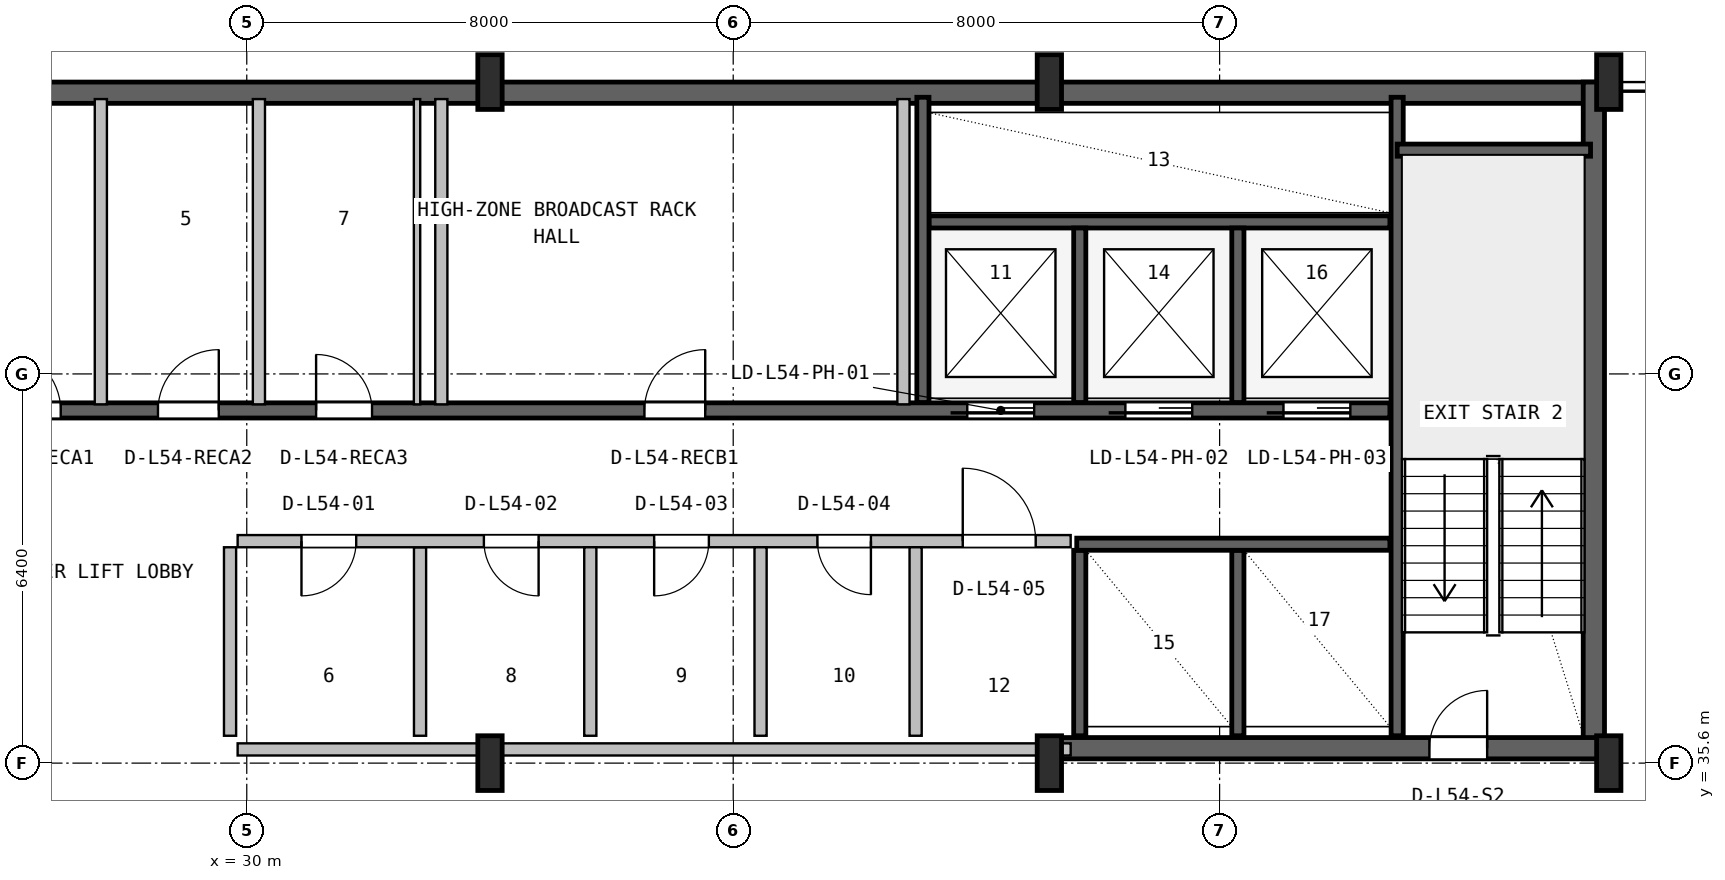
"""IFC4 building model, lengths in metres.
Left out: names, types, materials, properties, quantities, classifications, styles, units other than length and angle.
Written with IfcOpenShell. Run it as: python <this file> out.ifc"""

import sys

from ifc_helpers import new_model, si_unit, direction, frame, frame_2d, origin, origin_2d, place, context, subcontext, project, spatial, rectangle, i_section, extrude, source, transform, mapped, element, fill, save


model = new_model("IFC4")
c1 = context("Model", 3, precision=1e-05, world=origin(), true_north=direction((0.0, 1.0)))
c2 = subcontext(c1, "Body", "Model", "MODEL_VIEW")
j1 = project(units=[si_unit("LENGTHUNIT", "METRE"), si_unit("PLANEANGLEUNIT", "RADIAN")], contexts=[c1])
p1 = place(None, origin())
s1 = spatial("IfcSite", under=j1, at=p1, CompositionType="ELEMENT")
p2 = place(p1, origin())
s2 = spatial("IfcBuilding", under=s1, at=p2, CompositionType="ELEMENT")
p3 = place(p2, frame((0.0, 0.0, 218.8)))
s3 = spatial("IfcBuildingStorey", under=s2, at=p3, CompositionType="ELEMENT", Elevation=218.8)
p4 = place(p3, frame((15.6, 46.625, 0.0), z_axis=(0.0, 0.0, 1.0), x_axis=(1.0, 0.0, 0.0)))
e1 = element("IfcWall", 1, at=p4, inside=s3, PredefinedType="SHEAR", context=c2, shape_type="SweptSolid", body=[
    extrude(rectangle(XDim=36.8, YDim=0.35, at=frame_2d((18.4, 0.0))), origin(), (0.0, 0.0, 1.0), 3.55),
])
p5 = place(p3, frame((52.155, 35.67, 0.0), z_axis=(0.0, 0.0, 1.0), x_axis=(0.0, 1.0, 0.0)))
e2 = element("IfcWall", 2, at=p5, inside=s3, PredefinedType="SHEAR", context=c2, shape_type="SweptSolid", body=[
    extrude(rectangle(XDim=11.13, YDim=0.35, at=frame_2d((5.565, 0.0))), origin(), (0.0, 0.0, 1.0), 3.55),
])
p6 = place(p3, frame((43.2, 35.845, 0.0), z_axis=(0.0, 0.0, 1.0), x_axis=(1.0, 0.0, 0.0)))
e3 = element("IfcWall", 3, at=p6, inside=s3, PredefinedType="SHEAR", context=c2, shape_type="SweptSolid", body=[
    extrude(rectangle(XDim=9.13, YDim=0.35, at=frame_2d((4.565, 0.0))), origin(), (0.0, 0.0, 1.0), 3.55),
])
p7 = place(p6, frame((6.25, 0.0, 0.0)))
e4 = element("IfcOpeningElement", 4, at=p7, cuts=e3, PredefinedType="OPENING", context=c2, shape_type="SweptSolid", body=[
    extrude(rectangle(XDim=0.95, YDim=2.1, at=frame_2d((0.475, 1.05))), frame((0.0, 0.185, 0.0), z_axis=(0.0, -1.0, 0.0), x_axis=(1.0, 0.0, 0.0)), (0.0, 0.0, 1.0), 0.37),
])
m1 = source(origin(), c2, "Body", "SweptSolid", [
    extrude(i_section(OverallWidth=0.4, OverallDepth=0.9, WebThickness=0.016, FlangeThickness=0.028, FilletRadius=0.016, at=origin_2d()), origin(), (0.0, 0.0, 1.0), 3.8),
])
for number, where, z_axis, x_axis in (
    (5, (34.0, 35.6, 0.0), (0.0, 0.0, 1.0), (1.0, 0.0, 0.0)),
    (6, (34.0, 46.8, 0.0), (0.0, 0.0, 1.0), (1.0, 0.0, 0.0)),
    (7, (43.2, 35.6, 0.0), (0.0, 0.0, 1.0), (1.0, 0.0, 0.0)),
    (8, (43.2, 46.8, 0.0), (0.0, 0.0, 1.0), (1.0, 0.0, 0.0)),
    (9, (52.4, 35.6, 0.0), (0.0, 0.0, 1.0), (1.0, 0.0, 0.0)),
    (10, (52.4, 46.8, 0.0), (0.0, 0.0, 1.0), (1.0, 0.0, 0.0)),
):
    element("IfcColumn", number, at=place(p3, frame(where, z_axis=z_axis, x_axis=x_axis)), inside=s3, PredefinedType="COLUMN", context=c2, shape_type="MappedRepresentation", body=[
        mapped(m1, transform((0.0, 0.0, 0.0), x_axis=(1.0, 0.0, 0.0), y_axis=(0.0, 1.0, 0.0), z_axis=(0.0, 0.0, 1.0), scale=1.0)),
    ])
p8 = place(p3, frame((48.92, 36.05, 0.0), z_axis=(0.0, 0.0, 1.0), x_axis=(0.0, 1.0, 0.0)))
e11 = element("IfcWall", 11, at=p8, inside=s3, PredefinedType="SHEAR", context=c2, shape_type="SweptSolid", body=[
    extrude(rectangle(XDim=10.5, YDim=0.2, at=frame_2d((5.25, 0.0))), origin(), (0.0, 0.0, 1.0), 3.55),
])
p9 = place(p3, frame((48.92, 45.68, 0.0), z_axis=(0.0, 0.0, 1.0), x_axis=(1.0, 0.0, 0.0)))
e12 = element("IfcWall", 12, at=p9, inside=s3, PredefinedType="SHEAR", context=c2, shape_type="SweptSolid", body=[
    extrude(rectangle(XDim=3.18, YDim=0.2, at=frame_2d((1.59, 0.0))), origin(), (0.0, 0.0, 1.0), 3.55),
])
p10 = place(p3, frame((24.98, 41.4, 0.0), z_axis=(0.0, 0.0, 1.0), x_axis=(1.0, 0.0, 0.0)))
e13 = element("IfcWall", 13, at=p10, inside=s3, PredefinedType="SHEAR", context=c2, shape_type="SweptSolid", body=[
    extrude(rectangle(XDim=23.82, YDim=0.25, at=frame_2d((11.91, 0.0))), origin(), (0.0, 0.0, 1.0), 3.55),
])
p11 = place(p10, frame((16.87, 0.0, 0.0)))
e14 = element("IfcOpeningElement", 14, at=p11, cuts=e13, PredefinedType="OPENING", context=c2, shape_type="SweptSolid", body=[
    extrude(rectangle(XDim=1.1, YDim=2.18, at=frame_2d((0.55, 1.09))), frame((0.0, 0.135, 0.0), z_axis=(0.0, -1.0, 0.0), x_axis=(1.0, 0.0, 0.0)), (0.0, 0.0, 1.0), 0.27),
])
p12 = place(p10, frame((19.47, 0.0, 0.0)))
e15 = element("IfcOpeningElement", 15, at=p12, cuts=e13, PredefinedType="OPENING", context=c2, shape_type="SweptSolid", body=[
    extrude(rectangle(XDim=1.1, YDim=2.18, at=frame_2d((0.55, 1.09))), frame((0.0, 0.135, 0.0), z_axis=(0.0, -1.0, 0.0), x_axis=(1.0, 0.0, 0.0)), (0.0, 0.0, 1.0), 0.27),
])
p13 = place(p10, frame((22.07, 0.0, 0.0)))
e16 = element("IfcOpeningElement", 16, at=p13, cuts=e13, PredefinedType="OPENING", context=c2, shape_type="SweptSolid", body=[
    extrude(rectangle(XDim=1.1, YDim=2.18, at=frame_2d((0.55, 1.09))), frame((0.0, 0.135, 0.0), z_axis=(0.0, -1.0, 0.0), x_axis=(1.0, 0.0, 0.0)), (0.0, 0.0, 1.0), 0.27),
])
p14 = place(p10, frame((0.96, 0.0, 0.0)))
e17 = element("IfcOpeningElement", 17, at=p14, cuts=e13, PredefinedType="OPENING", context=c2, shape_type="SweptSolid", body=[
    extrude(rectangle(XDim=1.0, YDim=2.08, at=frame_2d((0.5, 1.04))), frame((0.0, 0.135, 0.0), z_axis=(0.0, -1.0, 0.0), x_axis=(1.0, 0.0, 0.0)), (0.0, 0.0, 1.0), 0.27),
])
p15 = place(p10, frame((3.56, 0.0, 0.0)))
e18 = element("IfcOpeningElement", 18, at=p15, cuts=e13, PredefinedType="OPENING", context=c2, shape_type="SweptSolid", body=[
    extrude(rectangle(XDim=1.0, YDim=2.08, at=frame_2d((0.5, 1.04))), frame((0.0, 0.135, 0.0), z_axis=(0.0, -1.0, 0.0), x_axis=(1.0, 0.0, 0.0)), (0.0, 0.0, 1.0), 0.27),
])
p16 = place(p10, frame((6.16, 0.0, 0.0)))
e19 = element("IfcOpeningElement", 19, at=p16, cuts=e13, PredefinedType="OPENING", context=c2, shape_type="SweptSolid", body=[
    extrude(rectangle(XDim=0.92, YDim=2.08, at=frame_2d((0.46, 1.04))), frame((0.0, 0.135, 0.0), z_axis=(0.0, -1.0, 0.0), x_axis=(1.0, 0.0, 0.0)), (0.0, 0.0, 1.0), 0.27),
])
p17 = place(p10, frame((11.56, 0.0, 0.0)))
e20 = element("IfcOpeningElement", 20, at=p17, cuts=e13, PredefinedType="OPENING", context=c2, shape_type="SweptSolid", body=[
    extrude(rectangle(XDim=1.0, YDim=2.08, at=frame_2d((0.5, 1.04))), frame((0.0, 0.135, 0.0), z_axis=(0.0, -1.0, 0.0), x_axis=(1.0, 0.0, 0.0)), (0.0, 0.0, 1.0), 0.27),
])
p18 = place(p3, frame((41.22, 44.5, 0.0), z_axis=(0.0, 0.0, 1.0), x_axis=(1.0, 0.0, 0.0)))
e21 = element("IfcWall", 21, at=p18, inside=s3, PredefinedType="SHEAR", context=c2, shape_type="SweptSolid", body=[
    extrude(rectangle(XDim=7.58, YDim=0.2, at=frame_2d((3.79, 0.0))), origin(), (0.0, 0.0, 1.0), 3.55),
])
p19 = place(p3, frame((41.12, 41.53, 0.0), z_axis=(0.0, 0.0, 1.0), x_axis=(0.0, 1.0, 0.0)))
e22 = element("IfcWall", 22, at=p19, inside=s3, PredefinedType="SHEAR", context=c2, shape_type="SweptSolid", body=[
    extrude(rectangle(XDim=5.02, YDim=0.2, at=frame_2d((2.51, 0.0))), origin(), (0.0, 0.0, 1.0), 3.55),
])
for number, where, z_axis, x_axis in (
    (23, (43.7, 41.53, 0.0), (0.0, 0.0, 1.0), (0.0, 1.0, 0.0)),
    (24, (46.3, 41.53, 0.0), (0.0, 0.0, 1.0), (0.0, 1.0, 0.0)),
):
    element("IfcWall", number, at=place(p3, frame(where, z_axis=z_axis, x_axis=x_axis)), inside=s3, PredefinedType="SHEAR", context=c2, shape_type="SweptSolid", body=[
        extrude(rectangle(XDim=2.87, YDim=0.2, at=frame_2d((1.435, 0.0))), origin(), (0.0, 0.0, 1.0), 3.55),
    ])
for number, where, z_axis, x_axis in (
    (25, (43.7, 36.05, 0.0), (0.0, 0.0, 1.0), (0.0, 1.0, 0.0)),
    (26, (46.3, 36.05, 0.0), (0.0, 0.0, 1.0), (0.0, 1.0, 0.0)),
):
    element("IfcWall", number, at=place(p3, frame(where, z_axis=z_axis, x_axis=x_axis)), inside=s3, PredefinedType="SHEAR", context=c2, shape_type="SweptSolid", body=[
        extrude(rectangle(XDim=3.05, YDim=0.2, at=frame_2d((1.525, 0.0))), origin(), (0.0, 0.0, 1.0), 3.55),
    ])
p20 = place(p3, frame((43.65, 39.2, 0.0), z_axis=(0.0, 0.0, 1.0), x_axis=(1.0, 0.0, 0.0)))
e27 = element("IfcWall", 27, at=p20, inside=s3, PredefinedType="SHEAR", context=c2, shape_type="SweptSolid", body=[
    extrude(rectangle(XDim=5.15, YDim=0.2, at=frame_2d((2.575, 0.0))), origin(), (0.0, 0.0, 1.0), 3.55),
])
p21 = place(p3, frame((29.85, 35.825, 0.0), z_axis=(0.0, 0.0, 1.0), x_axis=(1.0, 0.0, 0.0)))
e28 = element("IfcWall", 28, at=p21, inside=s3, PredefinedType="SOLIDWALL", context=c2, shape_type="SweptSolid", body=[
    extrude(rectangle(XDim=13.7, YDim=0.2, at=frame_2d((6.85, 0.0))), origin(), (0.0, 0.0, 1.0), 2.575),
])
p22 = place(p3, frame((32.85, 36.05, 0.0), z_axis=(0.0, 0.0, 1.0), x_axis=(0.0, 1.0, 0.0)))
e29 = element("IfcWall", 29, at=p22, inside=s3, PredefinedType="PLUMBINGWALL", context=c2, shape_type="SweptSolid", body=[
    extrude(rectangle(XDim=3.1, YDim=0.2, at=frame_2d((1.55, 0.0))), origin(), (0.0, 0.0, 1.0), 3.53),
])
p23 = place(p3, frame((29.85, 39.25, 0.0), z_axis=(0.0, 0.0, 1.0), x_axis=(1.0, 0.0, 0.0)))
e30 = element("IfcWall", 30, at=p23, inside=s3, PredefinedType="SOLIDWALL", context=c2, shape_type="SweptSolid", body=[
    extrude(rectangle(XDim=13.7, YDim=0.2, at=frame_2d((6.85, 0.0))), origin(), (0.0, 0.0, 1.0), 3.53),
])
p24 = place(p23, frame((1.05, 0.0, 0.0)))
e31 = element("IfcOpeningElement", 31, at=p24, cuts=e30, PredefinedType="OPENING", context=c2, shape_type="SweptSolid", body=[
    extrude(rectangle(XDim=0.9, YDim=2.06, at=frame_2d((0.45, 1.03))), frame((0.0, 0.11, 0.0), z_axis=(0.0, -1.0, 0.0), x_axis=(1.0, 0.0, 0.0)), (0.0, 0.0, 1.0), 0.22),
])
p25 = place(p23, frame((4.05, 0.0, 0.0)))
e32 = element("IfcOpeningElement", 32, at=p25, cuts=e30, PredefinedType="OPENING", context=c2, shape_type="SweptSolid", body=[
    extrude(rectangle(XDim=0.9, YDim=2.06, at=frame_2d((0.45, 1.03))), frame((0.0, 0.11, 0.0), z_axis=(0.0, -1.0, 0.0), x_axis=(1.0, 0.0, 0.0)), (0.0, 0.0, 1.0), 0.22),
])
p26 = place(p23, frame((6.85, 0.0, 0.0)))
e33 = element("IfcOpeningElement", 33, at=p26, cuts=e30, PredefinedType="OPENING", context=c2, shape_type="SweptSolid", body=[
    extrude(rectangle(XDim=0.9, YDim=2.06, at=frame_2d((0.45, 1.03))), frame((0.0, 0.11, 0.0), z_axis=(0.0, -1.0, 0.0), x_axis=(1.0, 0.0, 0.0)), (0.0, 0.0, 1.0), 0.22),
])
p27 = place(p23, frame((9.535, 0.0, 0.0)))
e34 = element("IfcOpeningElement", 34, at=p27, cuts=e30, PredefinedType="OPENING", context=c2, shape_type="SweptSolid", body=[
    extrude(rectangle(XDim=0.88, YDim=2.06, at=frame_2d((0.44, 1.03))), frame((0.0, 0.11, 0.0), z_axis=(0.0, -1.0, 0.0), x_axis=(1.0, 0.0, 0.0)), (0.0, 0.0, 1.0), 0.22),
])
p28 = place(p23, frame((11.925, 0.0, 0.0)))
e35 = element("IfcOpeningElement", 35, at=p28, cuts=e30, PredefinedType="OPENING", context=c2, shape_type="SweptSolid", body=[
    extrude(rectangle(XDim=1.2, YDim=2.1, at=frame_2d((0.6, 1.05))), frame((0.0, 0.11, 0.0), z_axis=(0.0, -1.0, 0.0), x_axis=(1.0, 0.0, 0.0)), (0.0, 0.0, 1.0), 0.22),
])
for number, where, z_axis, x_axis in (
    (36, (29.725, 36.05, 0.0), (0.0, 0.0, 1.0), (0.0, 1.0, 0.0)),
    (37, (35.65, 36.05, 0.0), (0.0, 0.0, 1.0), (0.0, 1.0, 0.0)),
    (38, (38.45, 36.05, 0.0), (0.0, 0.0, 1.0), (0.0, 1.0, 0.0)),
):
    element("IfcWall", number, at=place(p3, frame(where, z_axis=z_axis, x_axis=x_axis)), inside=s3, PredefinedType="PLUMBINGWALL", context=c2, shape_type="SweptSolid", body=[
        extrude(rectangle(XDim=3.1, YDim=0.2, at=frame_2d((1.55, 0.0))), origin(), (0.0, 0.0, 1.0), 3.53),
    ])
p29 = place(p3, frame((41.0, 36.05, 0.0), z_axis=(0.0, 0.0, 1.0), x_axis=(0.0, 1.0, 0.0)))
e39 = element("IfcWall", 39, at=p29, inside=s3, PredefinedType="SOLIDWALL", context=c2, shape_type="SweptSolid", body=[
    extrude(rectangle(XDim=3.1, YDim=0.2, at=frame_2d((1.55, 0.0))), origin(), (0.0, 0.0, 1.0), 3.53),
])
for number, where, z_axis, x_axis in (
    (40, (27.6, 41.5, 0.0), (0.0, 0.0, 1.0), (0.0, 1.0, 0.0)),
    (41, (30.2, 41.5, 0.0), (0.0, 0.0, 1.0), (0.0, 1.0, 0.0)),
):
    element("IfcWall", number, at=place(p3, frame(where, z_axis=z_axis, x_axis=x_axis)), inside=s3, PredefinedType="SOLIDWALL", context=c2, shape_type="SweptSolid", body=[
        extrude(rectangle(XDim=5.02, YDim=0.2, at=frame_2d((2.51, 0.0))), origin(), (0.0, 0.0, 1.0), 3.53),
    ])
p30 = place(p3, frame((32.8, 41.5, 0.0), z_axis=(0.0, 0.0, 1.0), x_axis=(0.0, 1.0, 0.0)))
e42 = element("IfcWall", 42, at=p30, inside=s3, PredefinedType="PARTITIONING", context=c2, shape_type="SweptSolid", body=[
    extrude(rectangle(XDim=5.02, YDim=0.105, at=frame_2d((2.51, 0.0))), origin(), (0.0, 0.0, 1.0), 3.53),
])
for number, where, z_axis, x_axis in (
    (43, (40.8, 41.5, 0.0), (0.0, 0.0, 1.0), (0.0, 1.0, 0.0)),
    (44, (33.2, 41.5, 0.0), (0.0, 0.0, 1.0), (0.0, 1.0, 0.0)),
):
    element("IfcWall", number, at=place(p3, frame(where, z_axis=z_axis, x_axis=x_axis)), inside=s3, PredefinedType="SOLIDWALL", context=c2, shape_type="SweptSolid", body=[
        extrude(rectangle(XDim=5.02, YDim=0.2, at=frame_2d((2.51, 0.0))), origin(), (0.0, 0.0, 1.0), 3.53),
    ])
m2 = source(origin(), c2, "Body", "SweptSolid", [
    extrude(rectangle(XDim=0.95, YDim=2.1, at=frame_2d((0.475, 1.05))), frame((0.0, 0.025, 0.0), z_axis=(0.0, -1.0, 0.0), x_axis=(1.0, 0.0, 0.0)), (0.0, 0.0, 1.0), 0.05),
])
p31 = place(p7, origin())
e45 = element("IfcDoor", 45, at=p31, inside=s3, OperationType="SINGLE_SWING_RIGHT", PredefinedType="DOOR", context=c2, shape_type="MappedRepresentation", body=[
    mapped(m2, transform((0.0, 0.0, 0.0), x_axis=(1.0, 0.0, 0.0), y_axis=(0.0, 1.0, 0.0), z_axis=(0.0, 0.0, 1.0), scale=1.0)),
])
fill(e4, e45)
m3 = source(origin(), c2, "Body", "SweptSolid", [
    extrude(rectangle(XDim=1.1, YDim=2.18, at=frame_2d((0.55, 1.09))), frame((0.0, 0.025, 0.0), z_axis=(0.0, -1.0, 0.0), x_axis=(1.0, 0.0, 0.0)), (0.0, 0.0, 1.0), 0.05),
])
p32 = place(p11, frame((1.1, 0.0, 0.0), z_axis=(0.0, 0.0, 1.0), x_axis=(-1.0, 0.0, 0.0)))
e46 = element("IfcDoor", 46, at=p32, inside=s3, OperationType="SLIDING_TO_LEFT", PredefinedType="DOOR", context=c2, shape_type="MappedRepresentation", body=[
    mapped(m3, transform((0.0, 0.0, 0.0), x_axis=(1.0, 0.0, 0.0), y_axis=(0.0, 1.0, 0.0), z_axis=(0.0, 0.0, 1.0), scale=1.0)),
])
fill(e14, e46)
p33 = place(p12, frame((1.1, 0.0, 0.0), z_axis=(0.0, 0.0, 1.0), x_axis=(-1.0, 0.0, 0.0)))
e47 = element("IfcDoor", 47, at=p33, inside=s3, OperationType="SLIDING_TO_LEFT", PredefinedType="DOOR", context=c2, shape_type="MappedRepresentation", body=[
    mapped(m3, transform((0.0, 0.0, 0.0), x_axis=(1.0, 0.0, 0.0), y_axis=(0.0, 1.0, 0.0), z_axis=(0.0, 0.0, 1.0), scale=1.0)),
])
fill(e15, e47)
p34 = place(p13, frame((1.1, 0.0, 0.0), z_axis=(0.0, 0.0, 1.0), x_axis=(-1.0, 0.0, 0.0)))
e48 = element("IfcDoor", 48, at=p34, inside=s3, OperationType="SLIDING_TO_LEFT", PredefinedType="DOOR", context=c2, shape_type="MappedRepresentation", body=[
    mapped(m3, transform((0.0, 0.0, 0.0), x_axis=(1.0, 0.0, 0.0), y_axis=(0.0, 1.0, 0.0), z_axis=(0.0, 0.0, 1.0), scale=1.0)),
])
fill(e16, e48)
m4 = source(origin(), c2, "Body", "SweptSolid", [
    extrude(rectangle(XDim=1.0, YDim=2.08, at=frame_2d((0.5, 1.04))), frame((0.0, 0.025, 0.0), z_axis=(0.0, -1.0, 0.0), x_axis=(1.0, 0.0, 0.0)), (0.0, 0.0, 1.0), 0.05),
])
p35 = place(p14, origin())
e49 = element("IfcDoor", 49, at=p35, inside=s3, OperationType="SINGLE_SWING_LEFT", PredefinedType="DOOR", context=c2, shape_type="MappedRepresentation", body=[
    mapped(m4, transform((0.0, 0.0, 0.0), x_axis=(1.0, 0.0, 0.0), y_axis=(0.0, 1.0, 0.0), z_axis=(0.0, 0.0, 1.0), scale=1.0)),
])
fill(e17, e49)
p36 = place(p15, origin())
e50 = element("IfcDoor", 50, at=p36, inside=s3, OperationType="SINGLE_SWING_RIGHT", PredefinedType="DOOR", context=c2, shape_type="MappedRepresentation", body=[
    mapped(m4, transform((0.0, 0.0, 0.0), x_axis=(1.0, 0.0, 0.0), y_axis=(0.0, 1.0, 0.0), z_axis=(0.0, 0.0, 1.0), scale=1.0)),
])
fill(e18, e50)
m5 = source(origin(), c2, "Body", "SweptSolid", [
    extrude(rectangle(XDim=0.92, YDim=2.08, at=frame_2d((0.46, 1.04))), frame((0.0, 0.025, 0.0), z_axis=(0.0, -1.0, 0.0), x_axis=(1.0, 0.0, 0.0)), (0.0, 0.0, 1.0), 0.05),
])
p37 = place(p16, origin())
e51 = element("IfcDoor", 51, at=p37, inside=s3, OperationType="SINGLE_SWING_LEFT", PredefinedType="DOOR", context=c2, shape_type="MappedRepresentation", body=[
    mapped(m5, transform((0.0, 0.0, 0.0), x_axis=(1.0, 0.0, 0.0), y_axis=(0.0, 1.0, 0.0), z_axis=(0.0, 0.0, 1.0), scale=1.0)),
])
fill(e19, e51)
p38 = place(p17, origin())
e52 = element("IfcDoor", 52, at=p38, inside=s3, OperationType="SINGLE_SWING_RIGHT", PredefinedType="DOOR", context=c2, shape_type="MappedRepresentation", body=[
    mapped(m4, transform((0.0, 0.0, 0.0), x_axis=(1.0, 0.0, 0.0), y_axis=(0.0, 1.0, 0.0), z_axis=(0.0, 0.0, 1.0), scale=1.0)),
])
fill(e20, e52)
m6 = source(origin(), c2, "Body", "SweptSolid", [
    extrude(rectangle(XDim=0.9, YDim=2.06, at=frame_2d((0.45, 1.03))), frame((0.0, 0.025, 0.0), z_axis=(0.0, -1.0, 0.0), x_axis=(1.0, 0.0, 0.0)), (0.0, 0.0, 1.0), 0.05),
])
p39 = place(p24, frame((0.9, 0.0, 0.0), z_axis=(0.0, 0.0, 1.0), x_axis=(-1.0, 0.0, 0.0)))
e53 = element("IfcDoor", 53, at=p39, inside=s3, OperationType="SINGLE_SWING_LEFT", PredefinedType="DOOR", context=c2, shape_type="MappedRepresentation", body=[
    mapped(m6, transform((0.0, 0.0, 0.0), x_axis=(1.0, 0.0, 0.0), y_axis=(0.0, 1.0, 0.0), z_axis=(0.0, 0.0, 1.0), scale=1.0)),
])
fill(e31, e53)
p40 = place(p25, frame((0.9, 0.0, 0.0), z_axis=(0.0, 0.0, 1.0), x_axis=(-1.0, 0.0, 0.0)))
e54 = element("IfcDoor", 54, at=p40, inside=s3, OperationType="SINGLE_SWING_RIGHT", PredefinedType="DOOR", context=c2, shape_type="MappedRepresentation", body=[
    mapped(m6, transform((0.0, 0.0, 0.0), x_axis=(1.0, 0.0, 0.0), y_axis=(0.0, 1.0, 0.0), z_axis=(0.0, 0.0, 1.0), scale=1.0)),
])
fill(e32, e54)
p41 = place(p26, frame((0.9, 0.0, 0.0), z_axis=(0.0, 0.0, 1.0), x_axis=(-1.0, 0.0, 0.0)))
e55 = element("IfcDoor", 55, at=p41, inside=s3, OperationType="SINGLE_SWING_LEFT", PredefinedType="DOOR", context=c2, shape_type="MappedRepresentation", body=[
    mapped(m6, transform((0.0, 0.0, 0.0), x_axis=(1.0, 0.0, 0.0), y_axis=(0.0, 1.0, 0.0), z_axis=(0.0, 0.0, 1.0), scale=1.0)),
])
fill(e33, e55)
m7 = source(origin(), c2, "Body", "SweptSolid", [
    extrude(rectangle(XDim=0.88, YDim=2.06, at=frame_2d((0.44, 1.03))), frame((0.0, 0.025, 0.0), z_axis=(0.0, -1.0, 0.0), x_axis=(1.0, 0.0, 0.0)), (0.0, 0.0, 1.0), 0.05),
])
p42 = place(p27, frame((0.88, 0.0, 0.0), z_axis=(0.0, 0.0, 1.0), x_axis=(-1.0, 0.0, 0.0)))
e56 = element("IfcDoor", 56, at=p42, inside=s3, OperationType="SINGLE_SWING_RIGHT", PredefinedType="DOOR", context=c2, shape_type="MappedRepresentation", body=[
    mapped(m7, transform((0.0, 0.0, 0.0), x_axis=(1.0, 0.0, 0.0), y_axis=(0.0, 1.0, 0.0), z_axis=(0.0, 0.0, 1.0), scale=1.0)),
])
fill(e34, e56)
m8 = source(origin(), c2, "Body", "SweptSolid", [
    extrude(rectangle(XDim=1.2, YDim=2.1, at=frame_2d((0.6, 1.05))), frame((0.0, 0.025, 0.0), z_axis=(0.0, -1.0, 0.0), x_axis=(1.0, 0.0, 0.0)), (0.0, 0.0, 1.0), 0.05),
])
p43 = place(p28, origin())
e57 = element("IfcDoor", 57, at=p43, inside=s3, OperationType="SINGLE_SWING_LEFT", PredefinedType="DOOR", context=c2, shape_type="MappedRepresentation", body=[
    mapped(m8, transform((0.0, 0.0, 0.0), x_axis=(1.0, 0.0, 0.0), y_axis=(0.0, 1.0, 0.0), z_axis=(0.0, 0.0, 1.0), scale=1.0)),
])
fill(e35, e57)
save(model, sys.argv[1])
